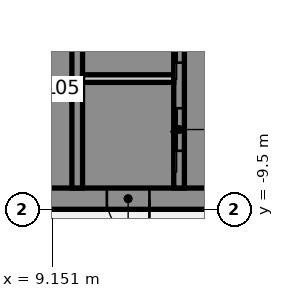
"""IFC4 building model, lengths in metres.
Left out: names, types, materials, properties, quantities, classifications, styles, units other than length and angle.
Written with IfcOpenShell. Run it as: python <this file> out.ifc"""

import sys

from ifc_helpers import new_model, si_unit, direction, frame, frame_2d, origin, place, context, subcontext, project, spatial, polyline, rectangle, outline, extrude, element, fill, save


model = new_model("IFC4")
c1 = context("Model", 3, precision=1e-05, world=origin(), true_north=direction((0.0, 1.0)))
c2 = subcontext(c1, "Body", "Model", "MODEL_VIEW")
j1 = project(units=[si_unit("LENGTHUNIT", "METRE"), si_unit("PLANEANGLEUNIT", "RADIAN")], contexts=[c1])
p1 = place(None, origin())
s1 = spatial("IfcSite", under=j1, at=p1, CompositionType="ELEMENT")
p2 = place(p1, origin())
s2 = spatial("IfcBuilding", under=s1, at=p2, CompositionType="ELEMENT")
p3 = place(p2, frame((0.0, 0.0, 29.5)))
s3 = spatial("IfcBuildingStorey", under=s2, at=p3, CompositionType="ELEMENT", Elevation=29.5)
p4 = place(p3, frame((16.5, -9.15, 0.0), z_axis=(0.0, 0.0, 1.0), x_axis=(-1.0, 0.0, 0.0)))
e1 = element("IfcWall", 1, at=p4, inside=s3, PredefinedType="SHEAR", context=c2, shape_type="SweptSolid", body=[
    extrude(rectangle(XDim=13.0, YDim=0.7, at=frame_2d((6.5, 0.0))), origin(), (0.0, 0.0, 1.0), 4.36),
])
p5 = place(p4, frame((4.15, 0.0, 0.0)))
e2 = element("IfcOpeningElement", 2, at=p5, cuts=e1, PredefinedType="OPENING", context=c2, shape_type="SweptSolid", body=[
    extrude(rectangle(XDim=1.4, YDim=2.1, at=frame_2d((0.7, 1.05))), frame((0.0, 0.36, 0.0), z_axis=(0.0, -1.0, 0.0), x_axis=(1.0, 0.0, 0.0)), (0.0, 0.0, 1.0), 0.72),
])
p6 = place(p4, frame((10.125, 0.0, 0.0)))
e3 = element("IfcOpeningElement", 3, at=p6, cuts=e1, PredefinedType="OPENING", context=c2, shape_type="SweptSolid", body=[
    extrude(rectangle(XDim=1.4, YDim=2.1, at=frame_2d((0.7, 1.05))), frame((0.0, 0.36, 0.0), z_axis=(0.0, -1.0, 0.0), x_axis=(1.0, 0.0, 0.0)), (0.0, 0.0, 1.0), 0.72),
])
p7 = place(p3, origin())
e4 = element("IfcWall", 4, at=p7, inside=s3, PredefinedType="SHEAR", context=c2, shape_type="SweptSolid", body=[
    extrude(outline(polyline([(13.5, -8.8), (15.8, -8.8), (16.5, -8.8), (16.5, 8.8), (15.8, 8.8), (13.5, 8.8), (13.5, 8.125), (15.8, 8.125), (15.8, 5.625), (13.5, 5.625), (13.5, 5.375), (15.8, 5.375), (15.8, 2.875), (13.5, 2.875), (13.5, 2.625), (15.8, 2.625), (15.8, 0.125), (13.5, 0.125), (13.5, -0.125), (15.8, -0.125), (15.8, -2.625), (13.5, -2.625), (13.5, -2.875), (15.8, -2.875), (15.8, -5.375), (13.5, -5.375), (13.5, -5.625), (15.8, -5.625), (15.8, -8.125), (13.5, -8.125), (13.5, -8.8)])), origin(), (0.0, 0.0, 1.0), 4.36),
])
p8 = place(p3, origin())
e5 = element("IfcWall", 5, at=p8, inside=s3, PredefinedType="SHEAR", context=c2, shape_type="SweptSolid", body=[
    extrude(outline(polyline([(9.8, -5.375), (7.5, -5.375), (7.5, -2.875), (9.8, -2.875), (9.8, -2.625), (7.5, -2.625), (7.5, -0.125), (9.8, -0.125), (9.8, 0.125), (7.5, 0.125), (7.5, 2.625), (9.8, 2.625), (9.8, 2.875), (7.5, 2.875), (7.5, 5.375), (9.8, 5.375), (9.8, 5.625), (7.5, 5.625), (7.5, 8.125), (9.8, 8.125), (9.8, 8.8), (7.5, 8.8), (7.15, 8.8), (7.15, -5.625), (7.5, -5.625), (9.8, -5.625), (9.8, -5.375)])), origin(), (0.0, 0.0, 1.0), 4.36),
])
p9 = place(p3, origin())
e6 = element("IfcWall", 6, at=p9, inside=s3, PredefinedType="SHEAR", context=c2, shape_type="SweptSolid", body=[
    extrude(outline(polyline([(7.5, -8.125), (7.5, -8.8), (9.8, -8.8), (9.8, -8.125), (9.8, -5.625), (9.55, -5.625), (9.55, -8.125), (7.5, -8.125)])), origin(), (0.0, 0.0, 1.0), 4.36),
])
p10 = place(p3, frame((13.325, -8.8, 0.0), z_axis=(0.0, 0.0, 1.0), x_axis=(0.0, 1.0, 0.0)))
e7 = element("IfcWall", 7, at=p10, inside=s3, PredefinedType="SHEAR", context=c2, shape_type="SweptSolid", body=[
    extrude(rectangle(XDim=17.6, YDim=0.35, at=frame_2d((8.8, 0.0))), origin(), (0.0, 0.0, 1.0), 4.36),
])
p11 = place(p10, frame((1.225, 0.0, 0.0)))
e8 = element("IfcOpeningElement", 8, at=p11, cuts=e7, PredefinedType="OPENING", context=c2, shape_type="SweptSolid", body=[
    extrude(rectangle(XDim=1.4, YDim=2.1, at=frame_2d((0.7, 1.05))), frame((0.0, 0.185, 0.0), z_axis=(0.0, -1.0, 0.0), x_axis=(1.0, 0.0, 0.0)), (0.0, 0.0, 1.0), 0.37),
])
p12 = place(p10, frame((4.125, 0.0, 0.0)))
e9 = element("IfcOpeningElement", 9, at=p12, cuts=e7, PredefinedType="OPENING", context=c2, shape_type="SweptSolid", body=[
    extrude(rectangle(XDim=1.1, YDim=2.1, at=frame_2d((0.55, 1.05))), frame((0.0, 0.185, 0.0), z_axis=(0.0, -1.0, 0.0), x_axis=(1.0, 0.0, 0.0)), (0.0, 0.0, 1.0), 0.37),
])
p13 = place(p10, frame((6.875, 0.0, 0.0)))
e10 = element("IfcOpeningElement", 10, at=p13, cuts=e7, PredefinedType="OPENING", context=c2, shape_type="SweptSolid", body=[
    extrude(rectangle(XDim=1.1, YDim=2.1, at=frame_2d((0.55, 1.05))), frame((0.0, 0.185, 0.0), z_axis=(0.0, -1.0, 0.0), x_axis=(1.0, 0.0, 0.0)), (0.0, 0.0, 1.0), 0.37),
])
p14 = place(p10, frame((9.625, 0.0, 0.0)))
e11 = element("IfcOpeningElement", 11, at=p14, cuts=e7, PredefinedType="OPENING", context=c2, shape_type="SweptSolid", body=[
    extrude(rectangle(XDim=1.1, YDim=2.1, at=frame_2d((0.55, 1.05))), frame((0.0, 0.185, 0.0), z_axis=(0.0, -1.0, 0.0), x_axis=(1.0, 0.0, 0.0)), (0.0, 0.0, 1.0), 0.37),
])
p15 = place(p10, frame((12.375, 0.0, 0.0)))
e12 = element("IfcOpeningElement", 12, at=p15, cuts=e7, PredefinedType="OPENING", context=c2, shape_type="SweptSolid", body=[
    extrude(rectangle(XDim=1.1, YDim=2.1, at=frame_2d((0.55, 1.05))), frame((0.0, 0.185, 0.0), z_axis=(0.0, -1.0, 0.0), x_axis=(1.0, 0.0, 0.0)), (0.0, 0.0, 1.0), 0.37),
])
p16 = place(p3, frame((9.975, -8.8, 0.0), z_axis=(0.0, 0.0, 1.0), x_axis=(0.0, 1.0, 0.0)))
e13 = element("IfcWall", 13, at=p16, inside=s3, PredefinedType="SHEAR", context=c2, shape_type="SweptSolid", body=[
    extrude(rectangle(XDim=17.6, YDim=0.35, at=frame_2d((8.8, 0.0))), origin(), (0.0, 0.0, 1.0), 4.36),
])
p17 = place(p16, frame((9.625, 0.0, 0.0)))
e14 = element("IfcOpeningElement", 14, at=p17, cuts=e13, PredefinedType="OPENING", context=c2, shape_type="SweptSolid", body=[
    extrude(rectangle(XDim=1.1, YDim=2.1, at=frame_2d((0.55, 1.05))), frame((0.0, 0.185, 0.0), z_axis=(0.0, -1.0, 0.0), x_axis=(1.0, 0.0, 0.0)), (0.0, 0.0, 1.0), 0.37),
])
p18 = place(p3, frame((13.15, -5.2, 0.0), z_axis=(0.0, 0.0, 1.0), x_axis=(-1.0, 0.0, 0.0)))
e15 = element("IfcWall", 15, at=p18, inside=s3, PredefinedType="PARTITIONING", context=c2, shape_type="SweptSolid", body=[
    extrude(rectangle(XDim=3.0, YDim=0.25, at=frame_2d((1.5, 0.0))), origin(), (0.0, 0.0, 1.0), 4.36),
])
p19 = place(p5, origin())
e16 = element("IfcDoor", 16, at=p19, inside=s3, OperationType="SINGLE_SWING_LEFT", PredefinedType="DOOR", context=c2, shape_type="SweptSolid", body=[
    extrude(rectangle(XDim=1.4, YDim=2.1, at=frame_2d((0.7, 1.05))), frame((0.0, 0.025, 0.0), z_axis=(0.0, -1.0, 0.0), x_axis=(1.0, 0.0, 0.0)), (0.0, 0.0, 1.0), 0.05),
])
fill(e2, e16)
p20 = place(p11, origin())
e17 = element("IfcDoor", 17, at=p20, inside=s3, OperationType="SLIDING_TO_LEFT", PredefinedType="DOOR", context=c2, shape_type="SweptSolid", body=[
    extrude(rectangle(XDim=1.4, YDim=2.1, at=frame_2d((0.7, 1.05))), frame((0.0, 0.025, 0.0), z_axis=(0.0, -1.0, 0.0), x_axis=(1.0, 0.0, 0.0)), (0.0, 0.0, 1.0), 0.05),
])
fill(e8, e17)
p21 = place(p12, origin())
e18 = element("IfcDoor", 18, at=p21, inside=s3, OperationType="SLIDING_TO_LEFT", PredefinedType="DOOR", context=c2, shape_type="SweptSolid", body=[
    extrude(rectangle(XDim=1.1, YDim=2.1, at=frame_2d((0.55, 1.05))), frame((0.0, 0.025, 0.0), z_axis=(0.0, -1.0, 0.0), x_axis=(1.0, 0.0, 0.0)), (0.0, 0.0, 1.0), 0.05),
])
fill(e9, e18)
save(model, sys.argv[1])
